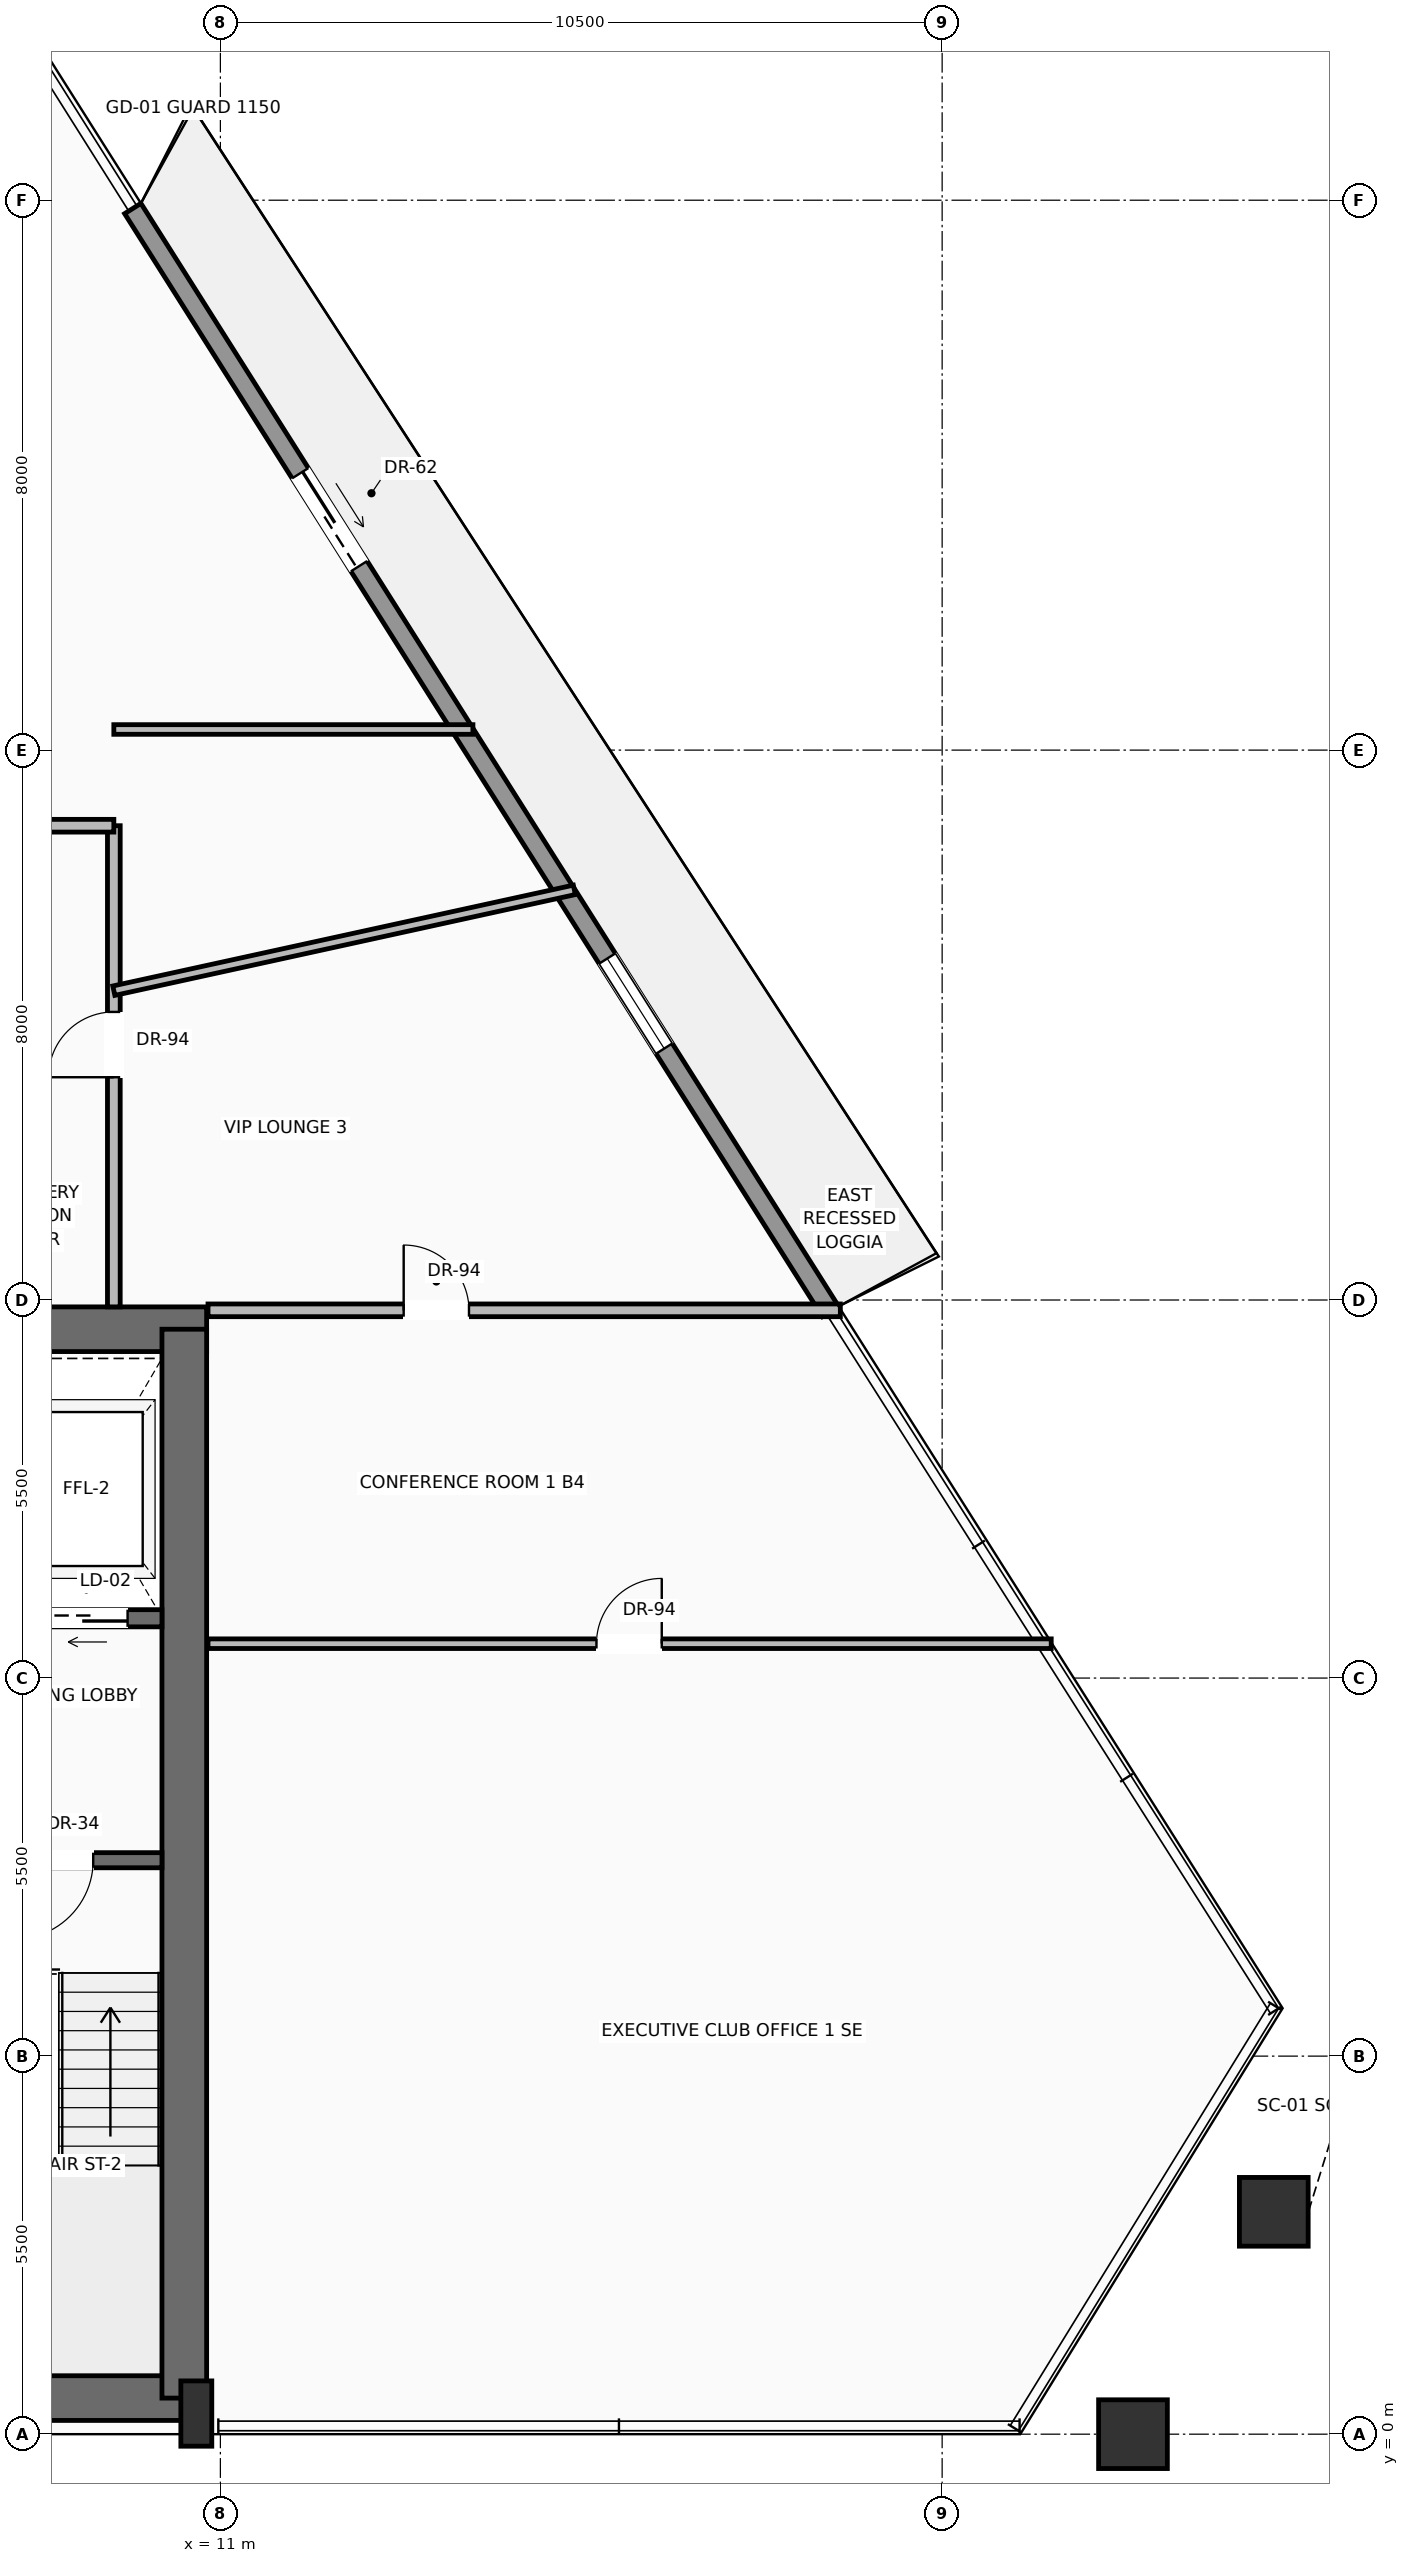
"""IFC4 building model, lengths in metres.
Left out: names, types, materials, properties, quantities, classifications, styles, units other than length and angle.
Written with IfcOpenShell. Run it as: python <this file> out.ifc"""

import sys

from ifc_helpers import new_model, si_unit, direction, frame, frame_2d, origin, origin_2d, place, context, subcontext, project, spatial, rectangle, hollow_rectangle, extrude, source, transform, mapped, element, fill, save


model = new_model("IFC4")
c1 = context("Model", 3, precision=1e-05, world=origin(), true_north=direction((0.0, 1.0)))
c2 = subcontext(c1, "Body", "Model", "MODEL_VIEW")
j1 = project(units=[si_unit("LENGTHUNIT", "METRE"), si_unit("PLANEANGLEUNIT", "RADIAN")], contexts=[c1])
p1 = place(None, origin())
s1 = spatial("IfcSite", under=j1, at=p1, CompositionType="ELEMENT")
p2 = place(p1, origin())
s2 = spatial("IfcBuilding", under=s1, at=p2, CompositionType="ELEMENT")
p3 = place(p2, frame((0.0, 0.0, 193.2)))
s3 = spatial("IfcBuildingStorey", under=s2, at=p3, CompositionType="ELEMENT", Elevation=193.2)
p4 = place(p3, frame((-10.65, 0.525, 0.0), z_axis=(0.0, 0.0, 1.0), x_axis=(1.0, 0.0, 0.0)))
e1 = element("IfcWall", 1, at=p4, inside=s3, PredefinedType="SHEAR", context=c2, shape_type="SweptSolid", body=[
    extrude(rectangle(XDim=21.3, YDim=0.65, at=frame_2d((10.65, 0.0))), origin(), (0.0, 0.0, 1.0), 3.47),
])
p5 = place(p3, frame((-10.8, 16.075, 0.0), z_axis=(0.0, 0.0, 1.0), x_axis=(1.0, 0.0, 0.0)))
e2 = element("IfcWall", 2, at=p5, inside=s3, PredefinedType="SHEAR", context=c2, shape_type="SweptSolid", body=[
    extrude(rectangle(XDim=21.6, YDim=0.65, at=frame_2d((10.8, 0.0))), origin(), (0.0, 0.0, 1.0), 3.47),
])
p6 = place(p5, frame((3.37, 0.0, 0.0)))
e3 = element("IfcOpeningElement", 3, at=p6, cuts=e2, PredefinedType="OPENING", context=c2, shape_type="SweptSolid", body=[
    extrude(rectangle(XDim=1.3, YDim=2.3, at=frame_2d((0.65, 1.15))), frame((0.0, 0.335, 0.0), z_axis=(0.0, -1.0, 0.0), x_axis=(1.0, 0.0, 0.0)), (0.0, 0.0, 1.0), 0.67),
])
p7 = place(p5, frame((9.8, 0.0, 0.0)))
e4 = element("IfcOpeningElement", 4, at=p7, cuts=e2, PredefinedType="OPENING", context=c2, shape_type="SweptSolid", body=[
    extrude(rectangle(XDim=2.0, YDim=2.4, at=frame_2d((1.0, 1.2))), frame((0.0, 0.335, 0.0), z_axis=(0.0, -1.0, 0.0), x_axis=(1.0, 0.0, 0.0)), (0.0, 0.0, 1.0), 0.67),
])
p8 = place(p3, frame((10.475, 0.525, 0.0), z_axis=(0.0, 0.0, 1.0), x_axis=(0.0, 1.0, 0.0)))
e5 = element("IfcWall", 5, at=p8, inside=s3, PredefinedType="SHEAR", context=c2, shape_type="SweptSolid", body=[
    extrude(rectangle(XDim=15.55, YDim=0.65, at=frame_2d((7.775, 0.0))), origin(), (0.0, 0.0, 1.0), 3.47),
])
m1 = source(origin(), c2, "Body", "SweptSolid", [
    extrude(rectangle(XDim=0.45, YDim=0.95, at=origin_2d()), origin(), (0.0, 0.0, 1.0), 3.7),
])
p9 = place(p3, frame((10.65, 0.3, 0.0), z_axis=(0.0, 0.0, 1.0), x_axis=(1.0, 0.0, 0.0)))
e6 = element("IfcColumn", 6, at=p9, inside=s3, PredefinedType="PILASTER", context=c2, shape_type="MappedRepresentation", body=[
    mapped(m1, transform((0.0, 0.0, 0.0), scale=1.0)),
])
m2 = source(origin(), c2, "Body", "SweptSolid", [
    extrude(hollow_rectangle(XDim=1.0, YDim=1.0, WallThickness=0.05, at=origin_2d()), origin(), (0.0, 0.0, 1.0), 3.691),
])
p10 = place(p3, frame((24.276, 0.0, 0.004), z_axis=(0.004828305383, 0.0, 0.999988343666), x_axis=(0.0, 1.0, 0.0)))
e7 = element("IfcColumn", 7, at=p10, inside=s3, PredefinedType="COLUMN", context=c2, shape_type="MappedRepresentation", body=[
    mapped(m2, transform((0.0, 0.0, 0.0), scale=1.0)),
])
m3 = source(origin(), c2, "Body", "SweptSolid", [
    extrude(hollow_rectangle(XDim=1.0, YDim=1.0, WallThickness=0.05, at=origin_2d()), origin(), (0.0, 0.0, 1.0), 3.692),
])
p11 = place(p3, frame((26.325, 3.235, 0.004), z_axis=(-0.006282695236, -0.014549399495, 0.999874413471), x_axis=(0.918062353536, -0.3964360163, 0.0)))
e8 = element("IfcColumn", 8, at=p11, inside=s3, PredefinedType="COLUMN", context=c2, shape_type="MappedRepresentation", body=[
    mapped(m3, transform((0.0, 0.0, 0.0), scale=1.0)),
])
p12 = place(p3, frame((9.726, 32.379, 0.0), z_axis=(0.0, 0.0, 1.0), x_axis=(0.534579680482, -0.845118077676, 0.0)))
e9 = element("IfcWall", 9, at=p12, inside=s3, PredefinedType="SOLIDWALL", context=c2, shape_type="SweptSolid", body=[
    extrude(rectangle(XDim=18.987, YDim=0.28, at=frame_2d((9.494, 0.0))), origin(), (0.0, 0.0, 1.0), 3.05),
])
p13 = place(p12, frame((4.557, 0.0, 0.0)))
e10 = element("IfcOpeningElement", 10, at=p13, cuts=e9, PredefinedType="OPENING", context=c2, shape_type="SweptSolid", body=[
    extrude(rectangle(XDim=1.6, YDim=2.35, at=frame_2d((0.8, 1.175))), frame((0.0, 0.15, 0.0), z_axis=(0.0, -1.0, 0.0), x_axis=(1.0, 0.0, 0.0)), (0.0, 0.0, 1.0), 0.3),
])
p14 = place(p12, frame((12.911, 0.0, 0.9)))
e11 = element("IfcOpeningElement", 11, at=p14, cuts=e9, PredefinedType="OPENING", context=c2, shape_type="SweptSolid", body=[
    extrude(rectangle(XDim=1.55, YDim=1.85, at=frame_2d((0.775, 0.925))), frame((0.0, 0.15, 0.0), z_axis=(0.0, -1.0, 0.0), x_axis=(1.0, 0.0, 0.0)), (0.0, 0.0, 1.0), 0.3),
])
p15 = place(p3, frame((10.15, 8.35, 0.0), z_axis=(0.0, 0.0, 1.0), x_axis=(-1.0, 0.0, 0.0)))
e12 = element("IfcWall", 12, at=p15, inside=s3, PredefinedType="SOLIDWALL", context=c2, shape_type="SweptSolid", body=[
    extrude(rectangle(XDim=4.65, YDim=0.22, at=frame_2d((2.325, 0.0))), origin(), (0.0, 0.0, 1.0), 3.47),
])
p16 = place(p15, frame((1.0, 0.0, 0.0)))
e13 = element("IfcOpeningElement", 13, at=p16, cuts=e12, PredefinedType="OPENING", context=c2, shape_type="SweptSolid", body=[
    extrude(rectangle(XDim=1.15, YDim=2.2, at=frame_2d((0.575, 1.1))), frame((0.0, 0.12, 0.0), z_axis=(0.0, -1.0, 0.0), x_axis=(1.0, 0.0, 0.0)), (0.0, 0.0, 1.0), 0.24),
])
p17 = place(p3, frame((10.15, 11.87, 0.0), z_axis=(0.0, 0.0, 1.0), x_axis=(-1.0, 0.0, 0.0)))
e14 = element("IfcWall", 14, at=p17, inside=s3, PredefinedType="SOLIDWALL", context=c2, shape_type="SweptSolid", body=[
    extrude(rectangle(XDim=4.65, YDim=0.25, at=frame_2d((2.325, 0.0))), origin(), (0.0, 0.0, 1.0), 3.47),
])
p18 = place(p17, frame((0.5, 0.0, 0.0)))
e15 = element("IfcOpeningElement", 15, at=p18, cuts=e14, PredefinedType="OPENING", context=c2, shape_type="SweptSolid", body=[
    extrude(rectangle(XDim=1.2, YDim=2.25, at=frame_2d((0.6, 1.125))), frame((0.0, 0.135, 0.0), z_axis=(0.0, -1.0, 0.0), x_axis=(1.0, 0.0, 0.0)), (0.0, 0.0, 1.0), 0.27),
])
p19 = place(p3, frame((9.45, 16.4, 0.0), z_axis=(0.0, 0.0, 1.0), x_axis=(0.0, 1.0, 0.0)))
e16 = element("IfcWall", 16, at=p19, inside=s3, PredefinedType="PARTITIONING", context=c2, shape_type="SweptSolid", body=[
    extrude(rectangle(XDim=7.0, YDim=0.185, at=frame_2d((3.5, 0.0))), origin(), (0.0, 0.0, 1.0), 3.462),
])
p20 = place(p19, frame((3.341, 0.0, 0.0)))
e17 = element("IfcOpeningElement", 17, at=p20, cuts=e16, PredefinedType="OPENING", context=c2, shape_type="SweptSolid", body=[
    extrude(rectangle(XDim=0.95, YDim=2.2, at=frame_2d((0.475, 1.1))), frame((0.0, 0.103, 0.0), z_axis=(0.0, -1.0, 0.0), x_axis=(1.0, 0.0, 0.0)), (0.0, 0.0, 1.0), 0.205),
])
p21 = place(p3, frame((7.25, 23.4, 0.0), z_axis=(0.0, 0.0, 1.0), x_axis=(1.0, 0.0, 0.0)))
e18 = element("IfcWall", 18, at=p21, inside=s3, PredefinedType="PARTITIONING", context=c2, shape_type="SweptSolid", body=[
    extrude(rectangle(XDim=2.2, YDim=0.185, at=frame_2d((1.1, 0.0))), origin(), (0.0, 0.0, 1.0), 3.462),
])
p22 = place(p3, frame((10.82, 16.35, 0.0), z_axis=(0.0, 0.0, 1.0), x_axis=(1.0, 0.0, 0.0)))
e19 = element("IfcWall", 19, at=p22, inside=s3, PredefinedType="PARTITIONING", context=c2, shape_type="SweptSolid", body=[
    extrude(rectangle(XDim=9.199, YDim=0.185, at=frame_2d((4.599, 0.0))), origin(), (0.0, 0.0, 1.0), 3.462),
])
p23 = place(p22, frame((2.847, 0.0, 0.0)))
e20 = element("IfcOpeningElement", 20, at=p23, cuts=e19, PredefinedType="OPENING", context=c2, shape_type="SweptSolid", body=[
    extrude(rectangle(XDim=0.95, YDim=2.2, at=frame_2d((0.475, 1.1))), frame((0.0, 0.103, 0.0), z_axis=(0.0, -1.0, 0.0), x_axis=(1.0, 0.0, 0.0)), (0.0, 0.0, 1.0), 0.205),
])
p24 = place(p3, frame((10.82, 11.5, 0.0), z_axis=(0.0, 0.0, 1.0), x_axis=(1.0, 0.0, 0.0)))
e21 = element("IfcWall", 21, at=p24, inside=s3, PredefinedType="PARTITIONING", context=c2, shape_type="SweptSolid", body=[
    extrude(rectangle(XDim=12.267, YDim=0.14, at=frame_2d((6.133, 0.0))), origin(), (0.0, 0.0, 1.0), 3.462),
])
p25 = place(p24, frame((5.651, 0.0, 0.0)))
e22 = element("IfcOpeningElement", 22, at=p25, cuts=e21, PredefinedType="OPENING", context=c2, shape_type="SweptSolid", body=[
    extrude(rectangle(XDim=0.95, YDim=2.2, at=frame_2d((0.475, 1.1))), frame((0.0, 0.08, 0.0), z_axis=(0.0, -1.0, 0.0), x_axis=(1.0, 0.0, 0.0)), (0.0, 0.0, 1.0), 0.16),
])
p26 = place(p3, frame((9.45, 21.0, 0.0), z_axis=(0.0, 0.0, 1.0), x_axis=(0.976862381204, 0.213868857455, 0.0)))
e23 = element("IfcWall", 23, at=p26, inside=s3, PredefinedType="PARTITIONING", context=c2, shape_type="SweptSolid", body=[
    extrude(rectangle(XDim=6.858, YDim=0.14, at=frame_2d((3.429, 0.0))), origin(), (0.0, 0.0, 1.0), 3.049),
])
p27 = place(p3, frame((9.45, 24.8, 0.0), z_axis=(0.0, 0.0, 1.0), x_axis=(1.0, 0.0, 0.0)))
e24 = element("IfcWall", 24, at=p27, inside=s3, PredefinedType="PARTITIONING", context=c2, shape_type="SweptSolid", body=[
    extrude(rectangle(XDim=5.224, YDim=0.14, at=frame_2d((2.612, 0.0))), origin(), (0.0, 0.0, 1.0), 3.462),
])
m4 = source(origin(), c2, "Body", "SweptSolid", [
    extrude(rectangle(XDim=1.6, YDim=2.35, at=frame_2d((0.8, 1.175))), frame((0.0, 0.025, 0.0), z_axis=(0.0, -1.0, 0.0), x_axis=(1.0, 0.0, 0.0)), (0.0, 0.0, 1.0), 0.05),
])
p28 = place(p13, origin())
e25 = element("IfcDoor", 25, at=p28, inside=s3, OperationType="SLIDING_TO_RIGHT", PredefinedType="DOOR", context=c2, shape_type="MappedRepresentation", body=[
    mapped(m4, transform((0.0, 0.0, 0.0), scale=1.0)),
])
fill(e10, e25)
m5 = source(origin(), c2, "Body", "SweptSolid", [
    extrude(rectangle(XDim=1.55, YDim=1.85, at=frame_2d((0.775, 0.925))), frame((0.0, 0.03, 0.0), z_axis=(0.0, -1.0, 0.0), x_axis=(1.0, 0.0, 0.0)), (0.0, 0.0, 1.0), 0.06),
])
p29 = place(p14, origin())
e26 = element("IfcWindow", 26, at=p29, inside=s3, PartitioningType="SINGLE_PANEL", PredefinedType="WINDOW", context=c2, shape_type="MappedRepresentation", body=[
    mapped(m5, transform((0.0, 0.0, 0.0), scale=1.0)),
])
fill(e11, e26)
m6 = source(origin(), c2, "Body", "SweptSolid", [
    extrude(rectangle(XDim=1.15, YDim=2.2, at=frame_2d((0.575, 1.1))), frame((0.0, 0.025, 0.0), z_axis=(0.0, -1.0, 0.0), x_axis=(1.0, 0.0, 0.0)), (0.0, 0.0, 1.0), 0.05),
])
p30 = place(p16, origin())
e27 = element("IfcDoor", 27, at=p30, inside=s3, OperationType="SINGLE_SWING_RIGHT", PredefinedType="DOOR", context=c2, shape_type="MappedRepresentation", body=[
    mapped(m6, transform((0.0, 0.0, 0.0), scale=1.0)),
])
fill(e13, e27)
m7 = source(origin(), c2, "Body", "SweptSolid", [
    extrude(rectangle(XDim=1.2, YDim=2.25, at=frame_2d((0.6, 1.125))), frame((0.0, 0.025, 0.0), z_axis=(0.0, -1.0, 0.0), x_axis=(1.0, 0.0, 0.0)), (0.0, 0.0, 1.0), 0.05),
])
p31 = place(p18, origin())
e28 = element("IfcDoor", 28, at=p31, inside=s3, OperationType="SLIDING_TO_RIGHT", PredefinedType="DOOR", context=c2, shape_type="MappedRepresentation", body=[
    mapped(m7, transform((0.0, 0.0, 0.0), scale=1.0)),
])
fill(e15, e28)
m8 = source(origin(), c2, "Body", "SweptSolid", [
    extrude(rectangle(XDim=0.95, YDim=2.2, at=frame_2d((0.475, 1.1))), frame((0.0, 0.025, 0.0), z_axis=(0.0, -1.0, 0.0), x_axis=(1.0, 0.0, 0.0)), (0.0, 0.0, 1.0), 0.05),
])
p32 = place(p20, origin())
e29 = element("IfcDoor", 29, at=p32, inside=s3, OperationType="SINGLE_SWING_LEFT", PredefinedType="DOOR", context=c2, shape_type="MappedRepresentation", body=[
    mapped(m8, transform((0.0, 0.0, 0.0), scale=1.0)),
])
fill(e17, e29)
p33 = place(p23, origin())
e30 = element("IfcDoor", 30, at=p33, inside=s3, OperationType="SINGLE_SWING_LEFT", PredefinedType="DOOR", context=c2, shape_type="MappedRepresentation", body=[
    mapped(m8, transform((0.0, 0.0, 0.0), scale=1.0)),
])
fill(e20, e30)
p34 = place(p25, origin())
e31 = element("IfcDoor", 31, at=p34, inside=s3, OperationType="SINGLE_SWING_RIGHT", PredefinedType="DOOR", context=c2, shape_type="MappedRepresentation", body=[
    mapped(m8, transform((0.0, 0.0, 0.0), scale=1.0)),
])
fill(e22, e31)
save(model, sys.argv[1])
